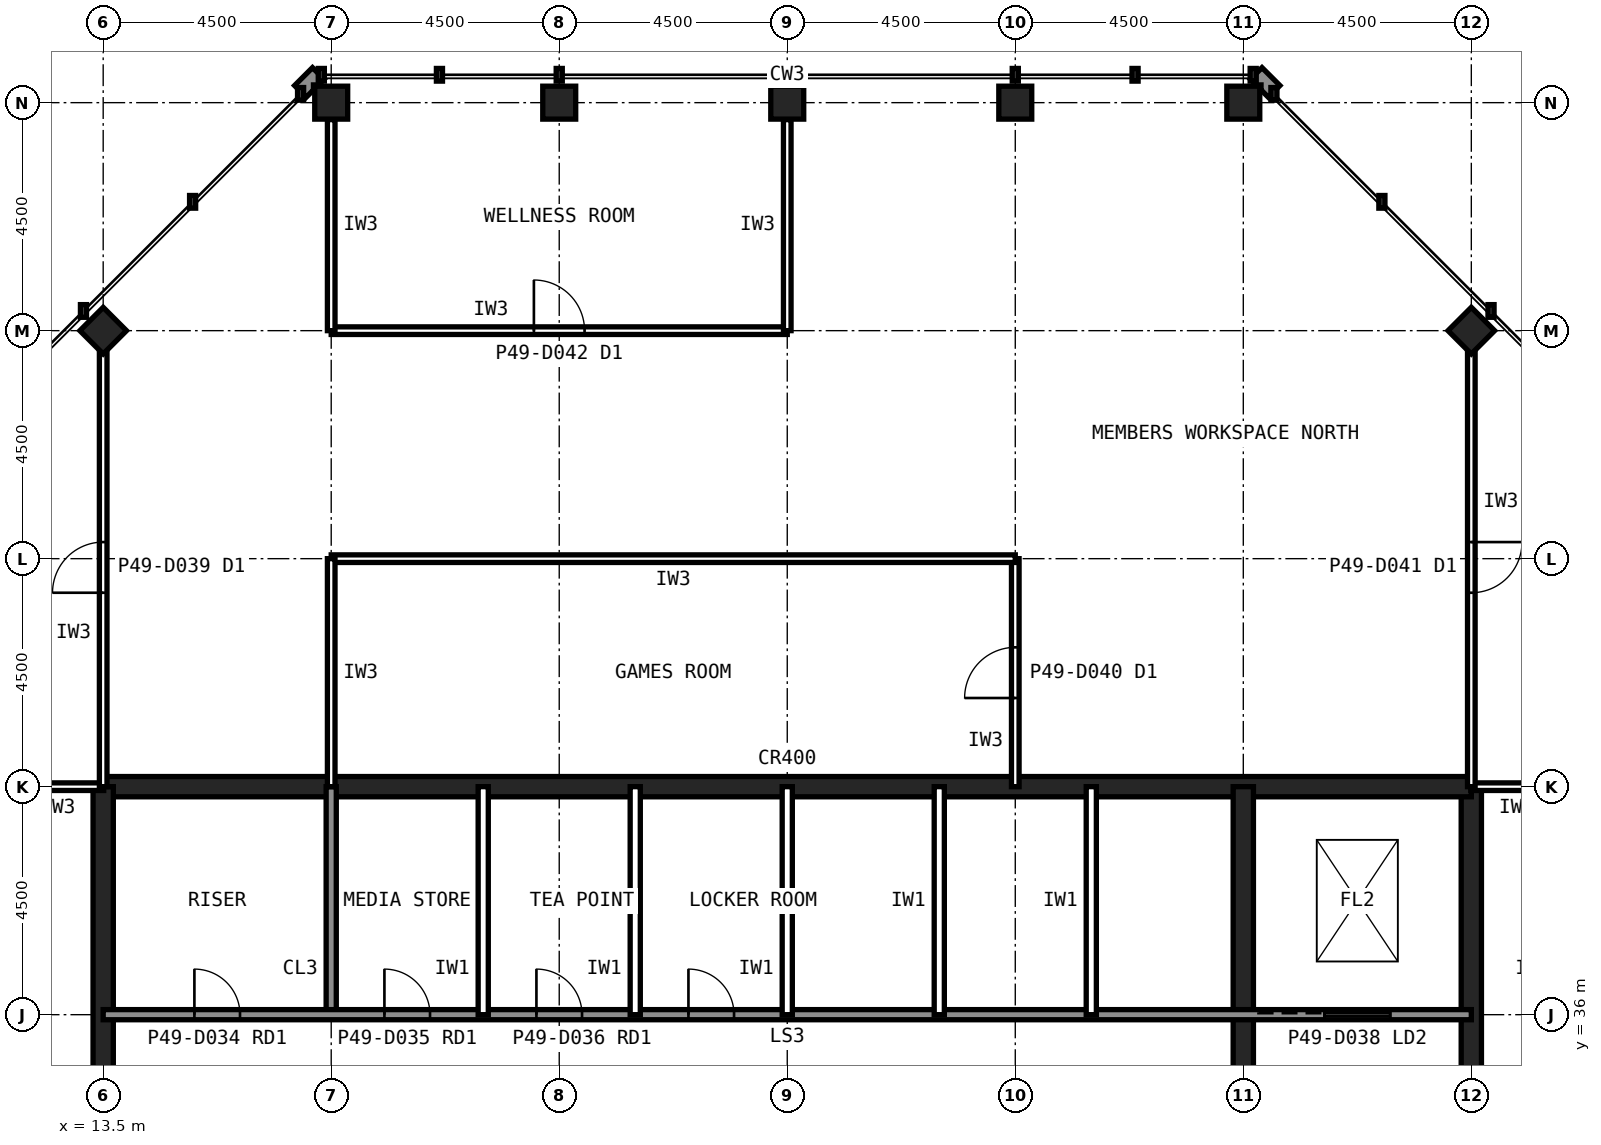
"""IFC4 building model, lengths in metres.
Left out: names, types, materials, properties, quantities, classifications, styles, units other than length and angle.
Written with IfcOpenShell. Run it as: python <this file> out.ifc"""

import sys

from ifc_helpers import new_model, si_unit, direction, frame, frame_2d, origin, origin_2d, place, context, subcontext, project, spatial, rectangle, hollow_rectangle, extrude, element, fill, save


model = new_model("IFC4")
c1 = context("Model", 3, precision=1e-05, world=origin(), true_north=direction((0.0, 1.0)))
c2 = subcontext(c1, "Body", "Model", "MODEL_VIEW")
j1 = project(units=[si_unit("LENGTHUNIT", "METRE"), si_unit("PLANEANGLEUNIT", "RADIAN")], contexts=[c1])
p1 = place(None, origin())
s1 = spatial("IfcSite", under=j1, at=p1, CompositionType="ELEMENT")
p2 = place(p1, origin())
s2 = spatial("IfcBuilding", under=s1, at=p2, CompositionType="ELEMENT")
p3 = place(p2, frame((0.0, 0.0, 210.6)))
s3 = spatial("IfcBuildingStorey", under=s2, at=p3, CompositionType="ELEMENT", Elevation=210.6)
for number, where, z_axis, x_axis in (
    (1, (36.0, 54.0, 0.0), (0.0, 0.0, 1.0), (1.0, 0.0, 0.0)),
    (2, (31.5, 54.0, 0.0), (0.0, 0.0, 1.0), (1.0, 0.0, 0.0)),
    (3, (27.0, 54.0, 0.0), (0.0, 0.0, 1.0), (1.0, 0.0, 0.0)),
    (4, (22.5, 54.0, 0.0), (0.0, 0.0, 1.0), (1.0, 0.0, 0.0)),
    (5, (18.0, 54.0, 0.0), (0.0, 0.0, 1.0), (1.0, 0.0, 0.0)),
    (6, (40.5, 49.5, 0.0), (0.0, 0.0, 1.0), (0.707, 0.707, 0.0)),
    (7, (13.5, 49.5, 0.0), (0.0, 0.0, 1.0), (0.707, 0.707, 0.0)),
):
    element("IfcColumn", number, at=place(p3, frame(where, z_axis=z_axis, x_axis=x_axis)), inside=s3, PredefinedType="COLUMN", context=c2, shape_type="SweptSolid", body=[
        extrude(hollow_rectangle(XDim=0.65, YDim=0.65, WallThickness=0.032, at=origin_2d()), origin(), (0.0, 0.0, 1.0), 4.0),
    ])
p4 = place(p3, frame((40.5, 13.5, 0.0), z_axis=(0.0, 0.0, 1.0), x_axis=(0.0, 1.0, 0.0)))
e8 = element("IfcWall", 8, at=p4, inside=s3, PredefinedType="SHEAR", context=c2, shape_type="SweptSolid", body=[
    extrude(rectangle(XDim=27.0, YDim=0.4, at=frame_2d((13.5, 0.0))), origin(), (0.0, 0.0, 1.0), 4.0),
])
p5 = place(p4, frame((5.85, 0.0, 0.0)))
e9 = element("IfcOpeningElement", 9, at=p5, cuts=e8, PredefinedType="OPENING", context=c2, shape_type="SweptSolid", body=[
    extrude(rectangle(XDim=1.8, YDim=2.1, at=frame_2d((0.9, 1.05))), frame((0.0, 0.21, 0.0), z_axis=(0.0, -1.0, 0.0), x_axis=(1.0, 0.0, 0.0)), (0.0, 0.0, 1.0), 0.42),
])
p6 = place(p4, frame((19.65, 0.0, 0.0)))
e10 = element("IfcOpeningElement", 10, at=p6, cuts=e8, PredefinedType="OPENING", context=c2, shape_type="SweptSolid", body=[
    extrude(rectangle(XDim=1.2, YDim=2.1, at=frame_2d((0.6, 1.05))), frame((0.0, 0.21, 0.0), z_axis=(0.0, -1.0, 0.0), x_axis=(1.0, 0.0, 0.0)), (0.0, 0.0, 1.0), 0.42),
])
p7 = place(p3, frame((40.5, 40.5, 0.0), z_axis=(0.0, 0.0, 1.0), x_axis=(-1.0, 0.0, 0.0)))
e11 = element("IfcWall", 11, at=p7, inside=s3, PredefinedType="SHEAR", context=c2, shape_type="SweptSolid", body=[
    extrude(rectangle(XDim=27.0, YDim=0.4, at=frame_2d((13.5, 0.0))), origin(), (0.0, 0.0, 1.0), 4.0),
])
p8 = place(p3, frame((13.5, 40.5, 0.0), z_axis=(0.0, 0.0, 1.0), x_axis=(0.0, -1.0, 0.0)))
e12 = element("IfcWall", 12, at=p8, inside=s3, PredefinedType="SHEAR", context=c2, shape_type="SweptSolid", body=[
    extrude(rectangle(XDim=27.0, YDim=0.4, at=frame_2d((13.5, 0.0))), origin(), (0.0, 0.0, 1.0), 4.0),
])
p9 = place(p8, frame((19.65, 0.0, 0.0)))
e13 = element("IfcOpeningElement", 13, at=p9, cuts=e12, PredefinedType="OPENING", context=c2, shape_type="SweptSolid", body=[
    extrude(rectangle(XDim=1.2, YDim=2.1, at=frame_2d((0.6, 1.05))), frame((0.0, 0.21, 0.0), z_axis=(0.0, -1.0, 0.0), x_axis=(1.0, 0.0, 0.0)), (0.0, 0.0, 1.0), 0.42),
])
p10 = place(p8, frame((5.85, 0.0, 0.0)))
e14 = element("IfcOpeningElement", 14, at=p10, cuts=e12, PredefinedType="OPENING", context=c2, shape_type="SweptSolid", body=[
    extrude(rectangle(XDim=1.8, YDim=2.1, at=frame_2d((0.9, 1.05))), frame((0.0, 0.21, 0.0), z_axis=(0.0, -1.0, 0.0), x_axis=(1.0, 0.0, 0.0)), (0.0, 0.0, 1.0), 0.42),
])
p11 = place(p3, frame((18.0, 36.0, 0.0), z_axis=(0.0, 0.0, 1.0), x_axis=(0.0, 1.0, 0.0)))
e15 = element("IfcWall", 15, at=p11, inside=s3, PredefinedType="SOLIDWALL", context=c2, shape_type="SweptSolid", body=[
    extrude(rectangle(XDim=4.5, YDim=0.2, at=frame_2d((2.25, 0.0))), origin(), (0.0, 0.0, 1.0), 3.84),
])
p12 = place(p3, frame((36.0, 22.5, 0.0), z_axis=(0.0, 0.0, 1.0), x_axis=(0.0, 1.0, 0.0)))
e16 = element("IfcWall", 16, at=p12, inside=s3, PredefinedType="SHEAR", context=c2, shape_type="SweptSolid", body=[
    extrude(rectangle(XDim=18.0, YDim=0.4, at=frame_2d((9.0, 0.0))), origin(), (0.0, 0.0, 1.0), 4.0),
])
p13 = place(p3, frame((13.5, 36.0, 0.0), z_axis=(0.0, 0.0, 1.0), x_axis=(1.0, 0.0, 0.0)))
e17 = element("IfcWall", 17, at=p13, inside=s3, PredefinedType="SOLIDWALL", context=c2, shape_type="SweptSolid", body=[
    extrude(rectangle(XDim=27.0, YDim=0.2, at=frame_2d((13.5, 0.0))), origin(), (0.0, 0.0, 1.0), 3.84),
])
p14 = place(p13, frame((1.8, 0.0, 0.0)))
e18 = element("IfcOpeningElement", 18, at=p14, cuts=e17, PredefinedType="OPENING", context=c2, shape_type="SweptSolid", body=[
    extrude(rectangle(XDim=0.9, YDim=2.1, at=frame_2d((0.45, 1.05))), frame((0.0, 0.11, 0.0), z_axis=(0.0, -1.0, 0.0), x_axis=(1.0, 0.0, 0.0)), (0.0, 0.0, 1.0), 0.22),
])
p15 = place(p13, frame((5.55, 0.0, 0.0)))
e19 = element("IfcOpeningElement", 19, at=p15, cuts=e17, PredefinedType="OPENING", context=c2, shape_type="SweptSolid", body=[
    extrude(rectangle(XDim=0.9, YDim=2.1, at=frame_2d((0.45, 1.05))), frame((0.0, 0.11, 0.0), z_axis=(0.0, -1.0, 0.0), x_axis=(1.0, 0.0, 0.0)), (0.0, 0.0, 1.0), 0.22),
])
p16 = place(p13, frame((8.55, 0.0, 0.0)))
e20 = element("IfcOpeningElement", 20, at=p16, cuts=e17, PredefinedType="OPENING", context=c2, shape_type="SweptSolid", body=[
    extrude(rectangle(XDim=0.9, YDim=2.1, at=frame_2d((0.45, 1.05))), frame((0.0, 0.11, 0.0), z_axis=(0.0, -1.0, 0.0), x_axis=(1.0, 0.0, 0.0)), (0.0, 0.0, 1.0), 0.22),
])
p17 = place(p13, frame((11.55, 0.0, 0.0)))
e21 = element("IfcOpeningElement", 21, at=p17, cuts=e17, PredefinedType="OPENING", context=c2, shape_type="SweptSolid", body=[
    extrude(rectangle(XDim=0.9, YDim=2.1, at=frame_2d((0.45, 1.05))), frame((0.0, 0.11, 0.0), z_axis=(0.0, -1.0, 0.0), x_axis=(1.0, 0.0, 0.0)), (0.0, 0.0, 1.0), 0.22),
])
p18 = place(p13, frame((24.1, 0.0, 0.0)))
e22 = element("IfcOpeningElement", 22, at=p18, cuts=e17, PredefinedType="OPENING", context=c2, shape_type="SweptSolid", body=[
    extrude(rectangle(XDim=1.3, YDim=2.2, at=frame_2d((0.65, 1.1))), frame((0.0, 0.11, 0.0), z_axis=(0.0, -1.0, 0.0), x_axis=(1.0, 0.0, 0.0)), (0.0, 0.0, 1.0), 0.22),
])
for number, where, z_axis, x_axis in (
    (23, (21.0, 36.0, 0.0), (0.0, 0.0, 1.0), (0.0, 1.0, 0.0)),
    (24, (24.0, 36.0, 0.0), (0.0, 0.0, 1.0), (0.0, 1.0, 0.0)),
    (25, (27.0, 36.0, 0.0), (0.0, 0.0, 1.0), (0.0, 1.0, 0.0)),
    (26, (30.0, 36.0, 0.0), (0.0, 0.0, 1.0), (0.0, 1.0, 0.0)),
    (27, (33.0, 36.0, 0.0), (0.0, 0.0, 1.0), (0.0, 1.0, 0.0)),
):
    element("IfcWall", number, at=place(p3, frame(where, z_axis=z_axis, x_axis=x_axis)), inside=s3, PredefinedType="PARTITIONING", context=c2, shape_type="SweptSolid", body=[
        extrude(rectangle(XDim=4.5, YDim=0.2, at=frame_2d((2.25, 0.0))), origin(), (0.0, 0.0, 1.0), 3.84),
    ])
for number, where, z_axis, x_axis in (
    (28, (13.51, 40.5, 0.0), (0.0, 0.0, 1.0), (-1.0, 0.0, 0.0)),
    (29, (42.3, 40.5, 0.0), (0.0, 0.0, 1.0), (-1.0, 0.0, 0.0)),
):
    element("IfcWall", number, at=place(p3, frame(where, z_axis=z_axis, x_axis=x_axis)), inside=s3, PredefinedType="PARTITIONING", context=c2, shape_type="SweptSolid", body=[
        extrude(rectangle(XDim=1.81, YDim=0.15, at=frame_2d((0.905, 0.0))), origin(), (0.0, 0.0, 1.0), 2.989),
    ])
p19 = place(p3, frame((31.5, 40.5, 0.0), z_axis=(0.0, 0.0, 1.0), x_axis=(0.0, 1.0, 0.0)))
e30 = element("IfcWall", 30, at=p19, inside=s3, PredefinedType="PARTITIONING", context=c2, shape_type="SweptSolid", body=[
    extrude(rectangle(XDim=4.5, YDim=0.15, at=frame_2d((2.25, 0.0))), origin(), (0.0, 0.0, 1.0), 2.989),
])
p20 = place(p19, frame((1.75, 0.0, 0.0)))
e31 = element("IfcOpeningElement", 31, at=p20, cuts=e30, PredefinedType="OPENING", context=c2, shape_type="SweptSolid", body=[
    extrude(rectangle(XDim=1.0, YDim=2.1, at=frame_2d((0.5, 1.05))), frame((0.0, 0.085, 0.0), z_axis=(0.0, -1.0, 0.0), x_axis=(1.0, 0.0, 0.0)), (0.0, 0.0, 1.0), 0.17),
])
p21 = place(p3, frame((31.5, 45.0, 0.0), z_axis=(0.0, 0.0, 1.0), x_axis=(-1.0, 0.0, 0.0)))
e32 = element("IfcWall", 32, at=p21, inside=s3, PredefinedType="PARTITIONING", context=c2, shape_type="SweptSolid", body=[
    extrude(rectangle(XDim=13.5, YDim=0.15, at=frame_2d((6.75, 0.0))), origin(), (0.0, 0.0, 1.0), 3.84),
])
p22 = place(p3, frame((18.0, 45.0, 0.0), z_axis=(0.0, 0.0, 1.0), x_axis=(0.0, -1.0, 0.0)))
e33 = element("IfcWall", 33, at=p22, inside=s3, PredefinedType="PARTITIONING", context=c2, shape_type="SweptSolid", body=[
    extrude(rectangle(XDim=4.5, YDim=0.15, at=frame_2d((2.25, 0.0))), origin(), (0.0, 0.0, 1.0), 2.989),
])
p23 = place(p3, frame((18.0, 49.5, 0.0), z_axis=(0.0, 0.0, 1.0), x_axis=(1.0, 0.0, 0.0)))
e34 = element("IfcWall", 34, at=p23, inside=s3, PredefinedType="PARTITIONING", context=c2, shape_type="SweptSolid", body=[
    extrude(rectangle(XDim=9.0, YDim=0.15, at=frame_2d((4.5, 0.0))), origin(), (0.0, 0.0, 1.0), 3.84),
])
p24 = place(p23, frame((4.0, 0.0, 0.0)))
e35 = element("IfcOpeningElement", 35, at=p24, cuts=e34, PredefinedType="OPENING", context=c2, shape_type="SweptSolid", body=[
    extrude(rectangle(XDim=1.0, YDim=2.1, at=frame_2d((0.5, 1.05))), frame((0.0, 0.085, 0.0), z_axis=(0.0, -1.0, 0.0), x_axis=(1.0, 0.0, 0.0)), (0.0, 0.0, 1.0), 0.17),
])
for number, where, z_axis, x_axis in (
    (36, (27.0, 49.5, 0.0), (0.0, 0.0, 1.0), (0.0, 1.0, 0.0)),
    (37, (18.0, 53.665, 0.0), (0.0, 0.0, 1.0), (0.0, -1.0, 0.0)),
):
    element("IfcWall", number, at=place(p3, frame(where, z_axis=z_axis, x_axis=x_axis)), inside=s3, PredefinedType="PARTITIONING", context=c2, shape_type="SweptSolid", body=[
        extrude(rectangle(XDim=4.165, YDim=0.15, at=frame_2d((2.083, 0.0))), origin(), (0.0, 0.0, 1.0), 2.989),
    ])
p25 = place(p3, frame((40.5, 49.155, 0.0), z_axis=(0.0, 0.0, 1.0), x_axis=(0.0, -1.0, 0.0)))
e38 = element("IfcWall", 38, at=p25, inside=s3, PredefinedType="PARTITIONING", context=c2, shape_type="SweptSolid", body=[
    extrude(rectangle(XDim=8.655, YDim=0.15, at=frame_2d((4.328, 0.0))), origin(), (0.0, 0.0, 1.0), 2.989),
])
p26 = place(p25, frame((3.827, 0.0, 0.0)))
e39 = element("IfcOpeningElement", 39, at=p26, cuts=e38, PredefinedType="OPENING", context=c2, shape_type="SweptSolid", body=[
    extrude(rectangle(XDim=1.0, YDim=2.1, at=frame_2d((0.5, 1.05))), frame((0.0, 0.085, 0.0), z_axis=(0.0, -1.0, 0.0), x_axis=(1.0, 0.0, 0.0)), (0.0, 0.0, 1.0), 0.17),
])
p27 = place(p3, frame((13.5, 40.5, 0.0), z_axis=(0.0, 0.0, 1.0), x_axis=(0.0, 1.0, 0.0)))
e40 = element("IfcWall", 40, at=p27, inside=s3, PredefinedType="PARTITIONING", context=c2, shape_type="SweptSolid", body=[
    extrude(rectangle(XDim=8.655, YDim=0.15, at=frame_2d((4.328, 0.0))), origin(), (0.0, 0.0, 1.0), 2.989),
])
p28 = place(p27, frame((3.827, 0.0, 0.0)))
e41 = element("IfcOpeningElement", 41, at=p28, cuts=e40, PredefinedType="OPENING", context=c2, shape_type="SweptSolid", body=[
    extrude(rectangle(XDim=1.0, YDim=2.1, at=frame_2d((0.5, 1.05))), frame((0.0, 0.085, 0.0), z_axis=(0.0, -1.0, 0.0), x_axis=(1.0, 0.0, 0.0)), (0.0, 0.0, 1.0), 0.17),
])
p29 = place(p14, origin())
e42 = element("IfcDoor", 42, at=p29, inside=s3, OperationType="SINGLE_SWING_LEFT", PredefinedType="DOOR", context=c2, shape_type="SweptSolid", body=[
    extrude(rectangle(XDim=0.9, YDim=2.1, at=frame_2d((0.45, 1.05))), frame((0.0, 0.025, 0.0), z_axis=(0.0, -1.0, 0.0), x_axis=(1.0, 0.0, 0.0)), (0.0, 0.0, 1.0), 0.05),
])
fill(e18, e42)
p30 = place(p15, origin())
e43 = element("IfcDoor", 43, at=p30, inside=s3, OperationType="SINGLE_SWING_LEFT", PredefinedType="DOOR", context=c2, shape_type="SweptSolid", body=[
    extrude(rectangle(XDim=0.9, YDim=2.1, at=frame_2d((0.45, 1.05))), frame((0.0, 0.025, 0.0), z_axis=(0.0, -1.0, 0.0), x_axis=(1.0, 0.0, 0.0)), (0.0, 0.0, 1.0), 0.05),
])
fill(e19, e43)
p31 = place(p16, origin())
e44 = element("IfcDoor", 44, at=p31, inside=s3, OperationType="SINGLE_SWING_LEFT", PredefinedType="DOOR", context=c2, shape_type="SweptSolid", body=[
    extrude(rectangle(XDim=0.9, YDim=2.1, at=frame_2d((0.45, 1.05))), frame((0.0, 0.025, 0.0), z_axis=(0.0, -1.0, 0.0), x_axis=(1.0, 0.0, 0.0)), (0.0, 0.0, 1.0), 0.05),
])
fill(e20, e44)
p32 = place(p17, origin())
e45 = element("IfcDoor", 45, at=p32, inside=s3, OperationType="SINGLE_SWING_LEFT", PredefinedType="DOOR", context=c2, shape_type="SweptSolid", body=[
    extrude(rectangle(XDim=0.9, YDim=2.1, at=frame_2d((0.45, 1.05))), frame((0.0, 0.025, 0.0), z_axis=(0.0, -1.0, 0.0), x_axis=(1.0, 0.0, 0.0)), (0.0, 0.0, 1.0), 0.05),
])
fill(e21, e45)
p33 = place(p18, origin())
e46 = element("IfcDoor", 46, at=p33, inside=s3, OperationType="SLIDING_TO_LEFT", PredefinedType="DOOR", context=c2, shape_type="SweptSolid", body=[
    extrude(rectangle(XDim=1.3, YDim=2.2, at=frame_2d((0.65, 1.1))), frame((0.0, 0.025, 0.0), z_axis=(0.0, -1.0, 0.0), x_axis=(1.0, 0.0, 0.0)), (0.0, 0.0, 1.0), 0.05),
])
fill(e22, e46)
p34 = place(p20, origin())
e47 = element("IfcDoor", 47, at=p34, inside=s3, OperationType="SINGLE_SWING_LEFT", PredefinedType="DOOR", context=c2, shape_type="SweptSolid", body=[
    extrude(rectangle(XDim=1.0, YDim=2.1, at=frame_2d((0.5, 1.05))), frame((0.0, 0.025, 0.0), z_axis=(0.0, -1.0, 0.0), x_axis=(1.0, 0.0, 0.0)), (0.0, 0.0, 1.0), 0.05),
])
fill(e31, e47)
p35 = place(p24, origin())
e48 = element("IfcDoor", 48, at=p35, inside=s3, OperationType="SINGLE_SWING_LEFT", PredefinedType="DOOR", context=c2, shape_type="SweptSolid", body=[
    extrude(rectangle(XDim=1.0, YDim=2.1, at=frame_2d((0.5, 1.05))), frame((0.0, 0.025, 0.0), z_axis=(0.0, -1.0, 0.0), x_axis=(1.0, 0.0, 0.0)), (0.0, 0.0, 1.0), 0.05),
])
fill(e35, e48)
p36 = place(p26, origin())
e49 = element("IfcDoor", 49, at=p36, inside=s3, OperationType="SINGLE_SWING_LEFT", PredefinedType="DOOR", context=c2, shape_type="SweptSolid", body=[
    extrude(rectangle(XDim=1.0, YDim=2.1, at=frame_2d((0.5, 1.05))), frame((0.0, 0.025, 0.0), z_axis=(0.0, -1.0, 0.0), x_axis=(1.0, 0.0, 0.0)), (0.0, 0.0, 1.0), 0.05),
])
fill(e39, e49)
p37 = place(p28, origin())
e50 = element("IfcDoor", 50, at=p37, inside=s3, OperationType="SINGLE_SWING_LEFT", PredefinedType="DOOR", context=c2, shape_type="SweptSolid", body=[
    extrude(rectangle(XDim=1.0, YDim=2.1, at=frame_2d((0.5, 1.05))), frame((0.0, 0.025, 0.0), z_axis=(0.0, -1.0, 0.0), x_axis=(1.0, 0.0, 0.0)), (0.0, 0.0, 1.0), 0.05),
])
fill(e41, e50)
save(model, sys.argv[1])
